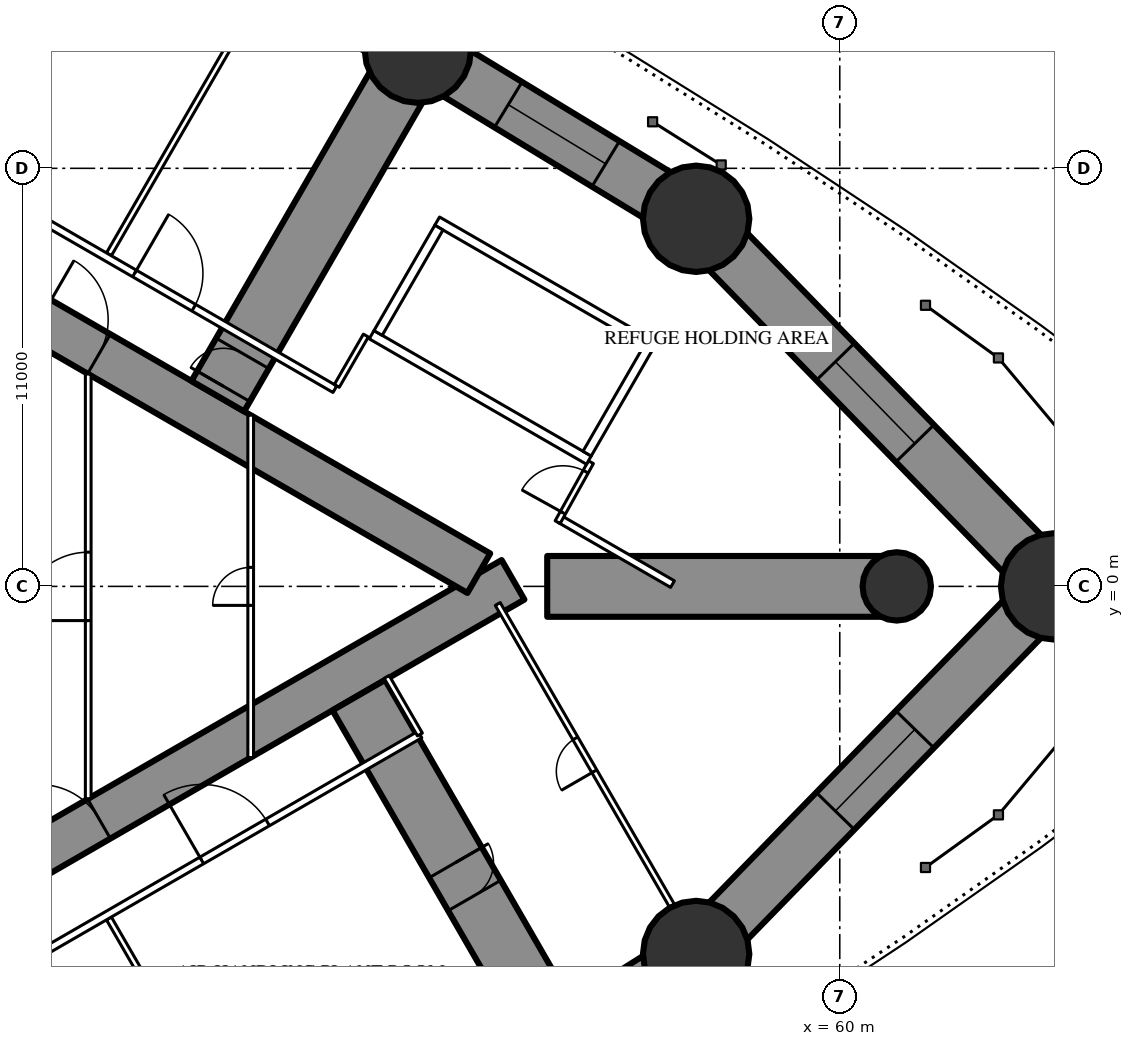
"""IFC4 building model, lengths in metres.
Left out: names, types, materials, properties, quantities, classifications, styles, units other than length and angle.
Written with IfcOpenShell. Run it as: python <this file> out.ifc"""

import sys

from ifc_helpers import new_model, si_unit, direction, frame, frame_2d, origin, origin_2d, place, context, subcontext, project, spatial, rectangle, circle, extrude, element, fill, save


model = new_model("IFC4")
c1 = context("Model", 3, precision=1e-05, world=origin(), true_north=direction((0.0, 1.0)))
c2 = subcontext(c1, "Body", "Model", "MODEL_VIEW")
j1 = project(units=[si_unit("LENGTHUNIT", "METRE"), si_unit("PLANEANGLEUNIT", "RADIAN")], contexts=[c1])
p1 = place(None, origin())
s1 = spatial("IfcSite", under=j1, at=p1, CompositionType="ELEMENT")
p2 = place(p1, origin())
s2 = spatial("IfcBuilding", under=s1, at=p2, CompositionType="ELEMENT")
p3 = place(p2, frame((0.0, 0.0, 152.7)))
s3 = spatial("IfcBuildingStorey", under=s2, at=p3, CompositionType="ELEMENT", Elevation=152.7)
for number, where, z_axis, x_axis in (
    (1, (65.64, 0.0, 0.0), (0.0, 0.0, 1.0), (1.0, 0.0, 0.0)),
    (2, (56.221, 9.672, 0.0), (0.0, 0.0, 1.0), (1.0, 0.0, 0.0)),
    (3, (48.897, 14.121, 0.0), (0.0, 0.0, 1.0), (1.0, 0.0, 0.0)),
    (4, (56.221, -9.672, 0.0), (0.0, 0.0, 1.0), (1.0, 0.0, 0.0)),
):
    element("IfcColumn", number, at=place(p3, frame(where, z_axis=z_axis, x_axis=x_axis)), inside=s3, PredefinedType="COLUMN", context=c2, shape_type="SweptSolid", body=[
        extrude(circle(Radius=1.4, at=origin_2d()), origin(), (0.0, 0.0, 1.0), 3.6),
    ])
p4 = place(p3, frame((61.5, 0.0, 0.0), z_axis=(0.0, 0.0, 1.0), x_axis=(1.0, 0.0, 0.0)))
e5 = element("IfcColumn", 5, at=p4, inside=s3, PredefinedType="COLUMN", context=c2, shape_type="SweptSolid", body=[
    extrude(circle(Radius=0.9, at=origin_2d()), origin(), (0.0, 0.0, 1.0), 3.6),
])
p5 = place(p3, frame((27.2, -13.8, 0.0), z_axis=(0.0, 0.0, 1.0), x_axis=(0.866027159892, 0.499996958321, 0.0)))
e6 = element("IfcWall", 6, at=p5, inside=s3, PredefinedType="SHEAR", context=c2, shape_type="SweptSolid", body=[
    extrude(rectangle(XDim=27.947, YDim=1.2, at=frame_2d((13.973, 0.0))), origin(), (0.0, 0.0, 1.0), 3.6),
])
p6 = place(p5, frame((4.6, 0.0, 0.0)))
e7 = element("IfcOpeningElement", 7, at=p6, cuts=e6, PredefinedType="OPENING", context=c2, shape_type="SweptSolid", body=[
    extrude(rectangle(XDim=1.0, YDim=2.2, at=frame_2d((0.5, 1.1))), frame((0.0, 0.61, 0.0), z_axis=(0.0, -1.0, 0.0), x_axis=(1.0, 0.0, 0.0)), (0.0, 0.0, 1.0), 1.22),
])
p7 = place(p5, frame((13.568, 0.0, 0.0)))
e8 = element("IfcOpeningElement", 8, at=p7, cuts=e6, PredefinedType="OPENING", context=c2, shape_type="SweptSolid", body=[
    extrude(rectangle(XDim=1.8, YDim=2.04, at=frame_2d((0.9, 1.02))), frame((0.0, 0.61, 0.0), z_axis=(0.0, -1.0, 0.0), x_axis=(1.0, 0.0, 0.0)), (0.0, 0.0, 1.0), 1.22),
])
p8 = place(p3, frame((27.2, 13.8, 0.0), z_axis=(0.0, 0.0, 1.0), x_axis=(0.866024515034, -0.500001539357, 0.0)))
e9 = element("IfcWall", 9, at=p8, inside=s3, PredefinedType="SHEAR", context=c2, shape_type="SweptSolid", body=[
    extrude(rectangle(XDim=26.907, YDim=1.2, at=frame_2d((13.454, 0.0))), origin(), (0.0, 0.0, 1.0), 3.6),
])
p9 = place(p8, frame((4.6, 0.0, 0.0)))
e10 = element("IfcOpeningElement", 10, at=p9, cuts=e9, PredefinedType="OPENING", context=c2, shape_type="SweptSolid", body=[
    extrude(rectangle(XDim=1.0, YDim=2.2, at=frame_2d((0.5, 1.1))), frame((0.0, 0.61, 0.0), z_axis=(0.0, -1.0, 0.0), x_axis=(1.0, 0.0, 0.0)), (0.0, 0.0, 1.0), 1.22),
])
p10 = place(p8, frame((13.568, 0.0, 0.0)))
e11 = element("IfcOpeningElement", 11, at=p10, cuts=e9, PredefinedType="OPENING", context=c2, shape_type="SweptSolid", body=[
    extrude(rectangle(XDim=1.8, YDim=2.04, at=frame_2d((0.9, 1.02))), frame((0.0, 0.61, 0.0), z_axis=(0.0, -1.0, 0.0), x_axis=(1.0, 0.0, 0.0)), (0.0, 0.0, 1.0), 1.22),
])
p11 = place(p3, frame((47.345, -2.862, 0.0), z_axis=(0.0, 0.0, 1.0), x_axis=(0.500012973899, -0.866017913171, 0.0)))
e12 = element("IfcWall", 12, at=p11, inside=s3, PredefinedType="SHEAR", context=c2, shape_type="SweptSolid", body=[
    extrude(rectangle(XDim=10.499, YDim=1.6, at=frame_2d((5.25, 0.0))), origin(), (0.0, 0.0, 1.0), 3.6),
])
p12 = place(p11, frame((5.087, 0.0, 0.0)))
e13 = element("IfcOpeningElement", 13, at=p12, cuts=e12, PredefinedType="OPENING", context=c2, shape_type="SweptSolid", body=[
    extrude(rectangle(XDim=1.0, YDim=2.2, at=frame_2d((0.5, 1.1))), frame((0.0, 0.81, 0.0), z_axis=(0.0, -1.0, 0.0), x_axis=(1.0, 0.0, 0.0)), (0.0, 0.0, 1.0), 1.62),
])
p13 = place(p3, frame((52.302, 0.0, 0.0), z_axis=(0.0, 0.0, 1.0), x_axis=(1.0, 0.0, 0.0)))
e14 = element("IfcWall", 14, at=p13, inside=s3, PredefinedType="SHEAR", context=c2, shape_type="SweptSolid", body=[
    extrude(rectangle(XDim=9.198, YDim=1.6, at=frame_2d((4.599, 0.0))), origin(), (0.0, 0.0, 1.0), 3.6),
])
p14 = place(p3, frame((43.634, 5.004, 0.0), z_axis=(0.0, 0.0, 1.0), x_axis=(0.499995493849, 0.866028005396, 0.0)))
e15 = element("IfcWall", 15, at=p14, inside=s3, PredefinedType="SHEAR", context=c2, shape_type="SweptSolid", body=[
    extrude(rectangle(XDim=10.526, YDim=1.6, at=frame_2d((5.263, 0.0))), origin(), (0.0, 0.0, 1.0), 3.6),
])
p15 = place(p14, frame((0.3, 0.0, 0.0)))
e16 = element("IfcOpeningElement", 16, at=p15, cuts=e15, PredefinedType="OPENING", context=c2, shape_type="SweptSolid", body=[
    extrude(rectangle(XDim=1.0, YDim=2.2, at=frame_2d((0.5, 1.1))), frame((0.0, 0.81, 0.0), z_axis=(0.0, -1.0, 0.0), x_axis=(1.0, 0.0, 0.0)), (0.0, 0.0, 1.0), 1.62),
])
p16 = place(p3, frame((52.594, -11.955, 0.0), z_axis=(0.0, 0.0, 1.0), x_axis=(0.846348902569, 0.532628890617, 0.0)))
e17 = element("IfcWall", 17, at=p16, inside=s3, PredefinedType="SHEAR", context=c2, shape_type="SweptSolid", body=[
    extrude(rectangle(XDim=4.285, YDim=1.4, at=frame_2d((2.143, 0.0))), origin(), (0.0, 0.0, 1.0), 3.6),
])
p17 = place(p3, frame((56.221, -9.672, 0.0), z_axis=(0.0, 0.0, 1.0), x_axis=(0.697649905443, 0.716438838587, 0.0)))
e18 = element("IfcWall", 18, at=p17, inside=s3, PredefinedType="SHEAR", context=c2, shape_type="SweptSolid", body=[
    extrude(rectangle(XDim=13.501, YDim=1.4, at=frame_2d((6.75, 0.0))), origin(), (0.0, 0.0, 1.0), 3.6),
])
p18 = place(p17, frame((5.25, 0.0, 0.6)))
e19 = element("IfcOpeningElement", 19, at=p18, cuts=e18, PredefinedType="OPENING", context=c2, shape_type="SweptSolid", body=[
    extrude(rectangle(XDim=3.0, YDim=1.2, at=frame_2d((1.5, 0.6))), frame((0.0, 0.71, 0.0), z_axis=(0.0, -1.0, 0.0), x_axis=(1.0, 0.0, 0.0)), (0.0, 0.0, 1.0), 1.42),
])
p19 = place(p3, frame((65.64, 0.0, 0.0), z_axis=(0.0, 0.0, 1.0), x_axis=(-0.697649905443, 0.716438838587, 0.0)))
e20 = element("IfcWall", 20, at=p19, inside=s3, PredefinedType="SHEAR", context=c2, shape_type="SweptSolid", body=[
    extrude(rectangle(XDim=13.501, YDim=1.4, at=frame_2d((6.75, 0.0))), origin(), (0.0, 0.0, 1.0), 3.6),
])
p20 = place(p19, frame((5.25, 0.0, 0.6)))
e21 = element("IfcOpeningElement", 21, at=p20, cuts=e20, PredefinedType="OPENING", context=c2, shape_type="SweptSolid", body=[
    extrude(rectangle(XDim=3.0, YDim=1.2, at=frame_2d((1.5, 0.6))), frame((0.0, 0.71, 0.0), z_axis=(0.0, -1.0, 0.0), x_axis=(1.0, 0.0, 0.0)), (0.0, 0.0, 1.0), 1.42),
])
p21 = place(p3, frame((56.221, 9.672, 0.0), z_axis=(0.0, 0.0, 1.0), x_axis=(-0.854692251129, 0.519135007353, 0.0)))
e22 = element("IfcWall", 22, at=p21, inside=s3, PredefinedType="SHEAR", context=c2, shape_type="SweptSolid", body=[
    extrude(rectangle(XDim=8.569, YDim=1.4, at=frame_2d((4.284, 0.0))), origin(), (0.0, 0.0, 1.0), 3.6),
])
p22 = place(p21, frame((2.784, 0.0, 0.6)))
e23 = element("IfcOpeningElement", 23, at=p22, cuts=e22, PredefinedType="OPENING", context=c2, shape_type="SweptSolid", body=[
    extrude(rectangle(XDim=3.0, YDim=1.2, at=frame_2d((1.5, 0.6))), frame((0.0, 0.71, 0.0), z_axis=(0.0, -1.0, 0.0), x_axis=(1.0, 0.0, 0.0)), (0.0, 0.0, 1.0), 1.42),
])
p23 = place(p3, frame((48.897, 14.121, 0.0), z_axis=(0.0, 0.0, 1.0), x_axis=(-0.878404597051, 0.477917737566, 0.0)))
e24 = element("IfcWall", 24, at=p23, inside=s3, PredefinedType="SHEAR", context=c2, shape_type="SweptSolid", body=[
    extrude(rectangle(XDim=4.285, YDim=1.4, at=frame_2d((2.143, 0.0))), origin(), (0.0, 0.0, 1.0), 3.6),
])
p24 = place(p3, frame((40.769, -8.737, 0.0), z_axis=(0.0, 0.0, 1.0), x_axis=(0.500013115284, -0.866017831539, 0.0)))
e25 = element("IfcWall", 25, at=p24, inside=s3, PredefinedType="PARTITIONING", context=c2, shape_type="SweptSolid", body=[
    extrude(rectangle(XDim=7.198, YDim=0.15, at=frame_2d((3.599, 0.0))), origin(), (0.0, 0.0, 1.0), 2.4),
])
p25 = place(p3, frame((55.583, -8.401, 0.0), z_axis=(0.0, 0.0, 1.0), x_axis=(-0.499997575924, 0.866026803321, 0.0)))
e26 = element("IfcWall", 26, at=p25, inside=s3, PredefinedType="PARTITIONING", context=c2, shape_type="SweptSolid", body=[
    extrude(rectangle(XDim=9.167, YDim=0.15, at=frame_2d((4.583, 0.0))), origin(), (0.0, 0.0, 1.0), 3.35),
])
p26 = place(p25, frame((4.083, 0.0, 0.0)))
e27 = element("IfcOpeningElement", 27, at=p26, cuts=e26, PredefinedType="OPENING", context=c2, shape_type="SweptSolid", body=[
    extrude(rectangle(XDim=1.0, YDim=2.2, at=frame_2d((0.5, 1.1))), frame((0.0, 0.085, 0.0), z_axis=(0.0, -1.0, 0.0), x_axis=(1.0, 0.0, 0.0)), (0.0, 0.0, 1.0), 0.17),
])
p27 = place(p3, frame((40.769, 8.737, 0.0), z_axis=(0.0, 0.0, 1.0), x_axis=(0.500013115284, 0.866017831539, 0.0)))
e28 = element("IfcWall", 28, at=p27, inside=s3, PredefinedType="PARTITIONING", context=c2, shape_type="SweptSolid", body=[
    extrude(rectangle(XDim=7.198, YDim=0.15, at=frame_2d((3.599, 0.0))), origin(), (0.0, 0.0, 1.0), 2.4),
])
p28 = place(p3, frame((36.834, 10.894, 0.0), z_axis=(0.0, 0.0, 1.0), x_axis=(0.866031655879, -0.499989170898, 0.0)))
e29 = element("IfcWall", 29, at=p28, inside=s3, PredefinedType="PARTITIONING", context=c2, shape_type="SweptSolid", body=[
    extrude(rectangle(XDim=11.41, YDim=0.2, at=frame_2d((5.705, 0.0))), origin(), (0.0, 0.0, 1.0), 3.35),
])
p29 = place(p28, frame((5.323, 0.0, 0.0)))
e30 = element("IfcOpeningElement", 30, at=p29, cuts=e29, PredefinedType="OPENING", context=c2, shape_type="SweptSolid", body=[
    extrude(rectangle(XDim=1.8, YDim=2.04, at=frame_2d((0.9, 1.02))), frame((0.0, 0.11, 0.0), z_axis=(0.0, -1.0, 0.0), x_axis=(1.0, 0.0, 0.0)), (0.0, 0.0, 1.0), 0.22),
])
p30 = place(p3, frame((52.639, 1.769, 0.0), z_axis=(0.0, 0.0, 1.0), x_axis=(0.866027340901, -0.4999966448, 0.0)))
e31 = element("IfcWall", 31, at=p30, inside=s3, PredefinedType="PARTITIONING", context=c2, shape_type="SweptSolid", body=[
    extrude(rectangle(XDim=3.417, YDim=0.2, at=frame_2d((1.708, 0.0))), origin(), (0.0, 0.0, 1.0), 3.35),
])
p31 = place(p3, frame((52.576, 1.689, 0.0), z_axis=(0.0, 0.0, 1.0), x_axis=(0.485482130951, 0.874246590229, 0.0)))
e32 = element("IfcWall", 32, at=p31, inside=s3, PredefinedType="PARTITIONING", context=c2, shape_type="SweptSolid", body=[
    extrude(rectangle(XDim=1.805, YDim=0.15, at=frame_2d((0.902, 0.0))), origin(), (0.0, 0.0, 1.0), 3.35),
])
p32 = place(p31, frame((0.285, 0.0, 0.0)))
e33 = element("IfcOpeningElement", 33, at=p32, cuts=e32, PredefinedType="OPENING", context=c2, shape_type="SweptSolid", body=[
    extrude(rectangle(XDim=1.235, YDim=2.2, at=frame_2d((0.618, 1.1))), frame((0.0, 0.085, 0.0), z_axis=(0.0, -1.0, 0.0), x_axis=(1.0, 0.0, 0.0)), (0.0, 0.0, 1.0), 0.17),
])
p33 = place(p3, frame((46.765, 5.275, 0.0), z_axis=(0.0, 0.0, 1.0), x_axis=(0.499915892944, 0.866073957571, 0.0)))
e34 = element("IfcWall", 34, at=p33, inside=s3, PredefinedType="PARTITIONING", context=c2, shape_type="SweptSolid", body=[
    extrude(rectangle(XDim=1.53, YDim=0.15, at=frame_2d((0.765, 0.0))), origin(), (0.0, 0.0, 1.0), 3.35),
])
p34 = place(p3, frame((27.903, -16.05, 0.0), z_axis=(0.0, 0.0, 1.0), x_axis=(0.86602417537, 0.500002127671, 0.0)))
e35 = element("IfcWall", 35, at=p34, inside=s3, PredefinedType="PARTITIONING", context=c2, shape_type="SweptSolid", body=[
    extrude(rectangle(XDim=24.307, YDim=0.2, at=frame_2d((12.153, 0.0))), origin(), (0.0, 0.0, 1.0), 3.35),
])
p35 = place(p34, frame((4.162, 0.0, 0.0)))
e36 = element("IfcOpeningElement", 36, at=p35, cuts=e35, PredefinedType="OPENING", context=c2, shape_type="SweptSolid", body=[
    extrude(rectangle(XDim=2.0, YDim=2.4, at=frame_2d((1.0, 1.2))), frame((0.0, 0.11, 0.0), z_axis=(0.0, -1.0, 0.0), x_axis=(1.0, 0.0, 0.0)), (0.0, 0.0, 1.0), 0.22),
])
p36 = place(p34, frame((17.678, 0.0, 0.0)))
e37 = element("IfcOpeningElement", 37, at=p36, cuts=e35, PredefinedType="OPENING", context=c2, shape_type="SweptSolid", body=[
    extrude(rectangle(XDim=2.0, YDim=2.4, at=frame_2d((1.0, 1.2))), frame((0.0, 0.11, 0.0), z_axis=(0.0, -1.0, 0.0), x_axis=(1.0, 0.0, 0.0)), (0.0, 0.0, 1.0), 0.22),
])
p37 = place(p3, frame((48.953, -3.897, 0.0), z_axis=(0.0, 0.0, 1.0), x_axis=(-0.499980071345, 0.866036909293, 0.0)))
e38 = element("IfcWall", 38, at=p37, inside=s3, PredefinedType="PARTITIONING", context=c2, shape_type="SweptSolid", body=[
    extrude(rectangle(XDim=1.75, YDim=0.15, at=frame_2d((0.875, 0.0))), origin(), (0.0, 0.0, 1.0), 3.35),
])
p38 = place(p3, frame((40.225, -5.587, 0.0), z_axis=(0.0, 0.0, 1.0), x_axis=(0.0, 1.0, 0.0)))
e39 = element("IfcWall", 39, at=p38, inside=s3, PredefinedType="PARTITIONING", context=c2, shape_type="SweptSolid", body=[
    extrude(rectangle(XDim=11.174, YDim=0.15, at=frame_2d((5.587, 0.0))), origin(), (0.0, 0.0, 1.0), 3.35),
])
p39 = place(p38, frame((4.687, 0.0, 0.0)))
e40 = element("IfcOpeningElement", 40, at=p39, cuts=e39, PredefinedType="OPENING", context=c2, shape_type="SweptSolid", body=[
    extrude(rectangle(XDim=1.8, YDim=2.2, at=frame_2d((0.9, 1.1))), frame((0.0, 0.085, 0.0), z_axis=(0.0, -1.0, 0.0), x_axis=(1.0, 0.0, 0.0)), (0.0, 0.0, 1.0), 0.17),
])
p40 = place(p3, frame((44.5, -4.505, 0.0), z_axis=(0.0, 0.0, 1.0), x_axis=(0.0, 1.0, 0.0)))
e41 = element("IfcWall", 41, at=p40, inside=s3, PredefinedType="PARTITIONING", context=c2, shape_type="SweptSolid", body=[
    extrude(rectangle(XDim=9.009, YDim=0.15, at=frame_2d((4.505, 0.0))), origin(), (0.0, 0.0, 1.0), 3.35),
])
p41 = place(p40, frame((4.005, 0.0, 0.0)))
e42 = element("IfcOpeningElement", 42, at=p41, cuts=e41, PredefinedType="OPENING", context=c2, shape_type="SweptSolid", body=[
    extrude(rectangle(XDim=1.0, YDim=2.2, at=frame_2d((0.5, 1.1))), frame((0.0, 0.085, 0.0), z_axis=(0.0, -1.0, 0.0), x_axis=(1.0, 0.0, 0.0)), (0.0, 0.0, 1.0), 0.17),
])
for number, where, z_axis, x_axis in (
    (43, (47.681, 6.622, 0.0), (0.0, 0.0, 1.0), (0.866, -0.5, 0.0)),
    (44, (49.406, 9.611, 0.0), (0.0, 0.0, 1.0), (0.866, -0.5, 0.0)),
):
    element("IfcWall", number, at=place(p3, frame(where, z_axis=z_axis, x_axis=x_axis)), inside=s3, PredefinedType="PARTITIONING", context=c2, shape_type="SweptSolid", body=[
        extrude(rectangle(XDim=6.6, YDim=0.25, at=frame_2d((3.3, 0.0))), origin(), (0.0, 0.0, 1.0), 3.35),
    ])
p42 = place(p3, frame((47.852, 6.668, 0.0), z_axis=(0.0, 0.0, 1.0), x_axis=(0.499929347863, 0.866066190972, 0.0)))
e45 = element("IfcWall", 45, at=p42, inside=s3, PredefinedType="PARTITIONING", context=c2, shape_type="SweptSolid", body=[
    extrude(rectangle(XDim=3.201, YDim=0.25, at=frame_2d((1.6, 0.0))), origin(), (0.0, 0.0, 1.0), 3.35),
])
p43 = place(p3, frame((53.352, 3.493, 0.0), z_axis=(0.0, 0.0, 1.0), x_axis=(0.499872130319, 0.866099216793, 0.0)))
e46 = element("IfcWall", 46, at=p43, inside=s3, PredefinedType="PARTITIONING", context=c2, shape_type="SweptSolid", body=[
    extrude(rectangle(XDim=3.2, YDim=0.25, at=frame_2d((1.6, 0.0))), origin(), (0.0, 0.0, 1.0), 3.35),
])
p44 = place(p18, origin())
e47 = element("IfcWindow", 47, at=p44, inside=s3, PartitioningType="SINGLE_PANEL", PredefinedType="WINDOW", context=c2, shape_type="SweptSolid", body=[
    extrude(rectangle(XDim=3.0, YDim=1.2, at=frame_2d((1.5, 0.6))), frame((0.0, 0.03, 0.0), z_axis=(0.0, -1.0, 0.0), x_axis=(1.0, 0.0, 0.0)), (0.0, 0.0, 1.0), 0.06),
])
fill(e19, e47)
p45 = place(p20, origin())
e48 = element("IfcWindow", 48, at=p45, inside=s3, PartitioningType="SINGLE_PANEL", PredefinedType="WINDOW", context=c2, shape_type="SweptSolid", body=[
    extrude(rectangle(XDim=3.0, YDim=1.2, at=frame_2d((1.5, 0.6))), frame((0.0, 0.03, 0.0), z_axis=(0.0, -1.0, 0.0), x_axis=(1.0, 0.0, 0.0)), (0.0, 0.0, 1.0), 0.06),
])
fill(e21, e48)
p46 = place(p22, origin())
e49 = element("IfcWindow", 49, at=p46, inside=s3, PartitioningType="SINGLE_PANEL", PredefinedType="WINDOW", context=c2, shape_type="SweptSolid", body=[
    extrude(rectangle(XDim=3.0, YDim=1.2, at=frame_2d((1.5, 0.6))), frame((0.0, 0.03, 0.0), z_axis=(0.0, -1.0, 0.0), x_axis=(1.0, 0.0, 0.0)), (0.0, 0.0, 1.0), 0.06),
])
fill(e23, e49)
p47 = place(p15, origin())
e50 = element("IfcDoor", 50, at=p47, inside=s3, OperationType="SINGLE_SWING_LEFT", PredefinedType="DOOR", context=c2, shape_type="SweptSolid", body=[
    extrude(rectangle(XDim=1.0, YDim=2.2, at=frame_2d((0.5, 1.1))), frame((0.0, 0.025, 0.0), z_axis=(0.0, -1.0, 0.0), x_axis=(1.0, 0.0, 0.0)), (0.0, 0.0, 1.0), 0.05),
])
fill(e16, e50)
p48 = place(p36, origin())
e51 = element("IfcDoor", 51, at=p48, inside=s3, OperationType="DOUBLE_DOOR_SINGLE_SWING", PredefinedType="DOOR", context=c2, shape_type="SweptSolid", body=[
    extrude(rectangle(XDim=2.0, YDim=2.4, at=frame_2d((1.0, 1.2))), frame((0.0, 0.025, 0.0), z_axis=(0.0, -1.0, 0.0), x_axis=(1.0, 0.0, 0.0)), (0.0, 0.0, 1.0), 0.05),
])
fill(e37, e51)
p49 = place(p29, origin())
e52 = element("IfcDoor", 52, at=p49, inside=s3, OperationType="DOUBLE_DOOR_SINGLE_SWING", PredefinedType="DOOR", context=c2, shape_type="SweptSolid", body=[
    extrude(rectangle(XDim=1.8, YDim=2.04, at=frame_2d((0.9, 1.02))), frame((0.0, 0.025, 0.0), z_axis=(0.0, -1.0, 0.0), x_axis=(1.0, 0.0, 0.0)), (0.0, 0.0, 1.0), 0.05),
])
fill(e30, e52)
p50 = place(p32, origin())
e53 = element("IfcDoor", 53, at=p50, inside=s3, OperationType="SINGLE_SWING_LEFT", PredefinedType="DOOR", context=c2, shape_type="SweptSolid", body=[
    extrude(rectangle(XDim=1.235, YDim=2.2, at=frame_2d((0.618, 1.1))), frame((0.0, 0.025, 0.0), z_axis=(0.0, -1.0, 0.0), x_axis=(1.0, 0.0, 0.0)), (0.0, 0.0, 1.0), 0.05),
])
fill(e33, e53)
p51 = place(p12, origin())
e54 = element("IfcDoor", 54, at=p51, inside=s3, OperationType="SINGLE_SWING_LEFT", PredefinedType="DOOR", context=c2, shape_type="SweptSolid", body=[
    extrude(rectangle(XDim=1.0, YDim=2.2, at=frame_2d((0.5, 1.1))), frame((0.0, 0.025, 0.0), z_axis=(0.0, -1.0, 0.0), x_axis=(1.0, 0.0, 0.0)), (0.0, 0.0, 1.0), 0.05),
])
fill(e13, e54)
p52 = place(p26, origin())
e55 = element("IfcDoor", 55, at=p52, inside=s3, OperationType="SINGLE_SWING_LEFT", PredefinedType="DOOR", context=c2, shape_type="SweptSolid", body=[
    extrude(rectangle(XDim=1.0, YDim=2.2, at=frame_2d((0.5, 1.1))), frame((0.0, 0.025, 0.0), z_axis=(0.0, -1.0, 0.0), x_axis=(1.0, 0.0, 0.0)), (0.0, 0.0, 1.0), 0.05),
])
fill(e27, e55)
p53 = place(p39, origin())
e56 = element("IfcDoor", 56, at=p53, inside=s3, OperationType="DOUBLE_DOOR_SINGLE_SWING", PredefinedType="DOOR", context=c2, shape_type="SweptSolid", body=[
    extrude(rectangle(XDim=1.8, YDim=2.2, at=frame_2d((0.9, 1.1))), frame((0.0, 0.025, 0.0), z_axis=(0.0, -1.0, 0.0), x_axis=(1.0, 0.0, 0.0)), (0.0, 0.0, 1.0), 0.05),
])
fill(e40, e56)
p54 = place(p41, origin())
e57 = element("IfcDoor", 57, at=p54, inside=s3, OperationType="SINGLE_SWING_LEFT", PredefinedType="DOOR", context=c2, shape_type="SweptSolid", body=[
    extrude(rectangle(XDim=1.0, YDim=2.2, at=frame_2d((0.5, 1.1))), frame((0.0, 0.025, 0.0), z_axis=(0.0, -1.0, 0.0), x_axis=(1.0, 0.0, 0.0)), (0.0, 0.0, 1.0), 0.05),
])
fill(e42, e57)
p55 = place(p7, origin())
e58 = element("IfcDoor", 58, at=p55, inside=s3, OperationType="DOUBLE_DOOR_SINGLE_SWING", PredefinedType="DOOR", context=c2, shape_type="SweptSolid", body=[
    extrude(rectangle(XDim=1.8, YDim=2.04, at=frame_2d((0.9, 1.02))), frame((0.0, 0.025, 0.0), z_axis=(0.0, -1.0, 0.0), x_axis=(1.0, 0.0, 0.0)), (0.0, 0.0, 1.0), 0.05),
])
fill(e8, e58)
p56 = place(p10, origin())
e59 = element("IfcDoor", 59, at=p56, inside=s3, OperationType="DOUBLE_DOOR_SINGLE_SWING", PredefinedType="DOOR", context=c2, shape_type="SweptSolid", body=[
    extrude(rectangle(XDim=1.8, YDim=2.04, at=frame_2d((0.9, 1.02))), frame((0.0, 0.025, 0.0), z_axis=(0.0, -1.0, 0.0), x_axis=(1.0, 0.0, 0.0)), (0.0, 0.0, 1.0), 0.05),
])
fill(e11, e59)
save(model, sys.argv[1])
